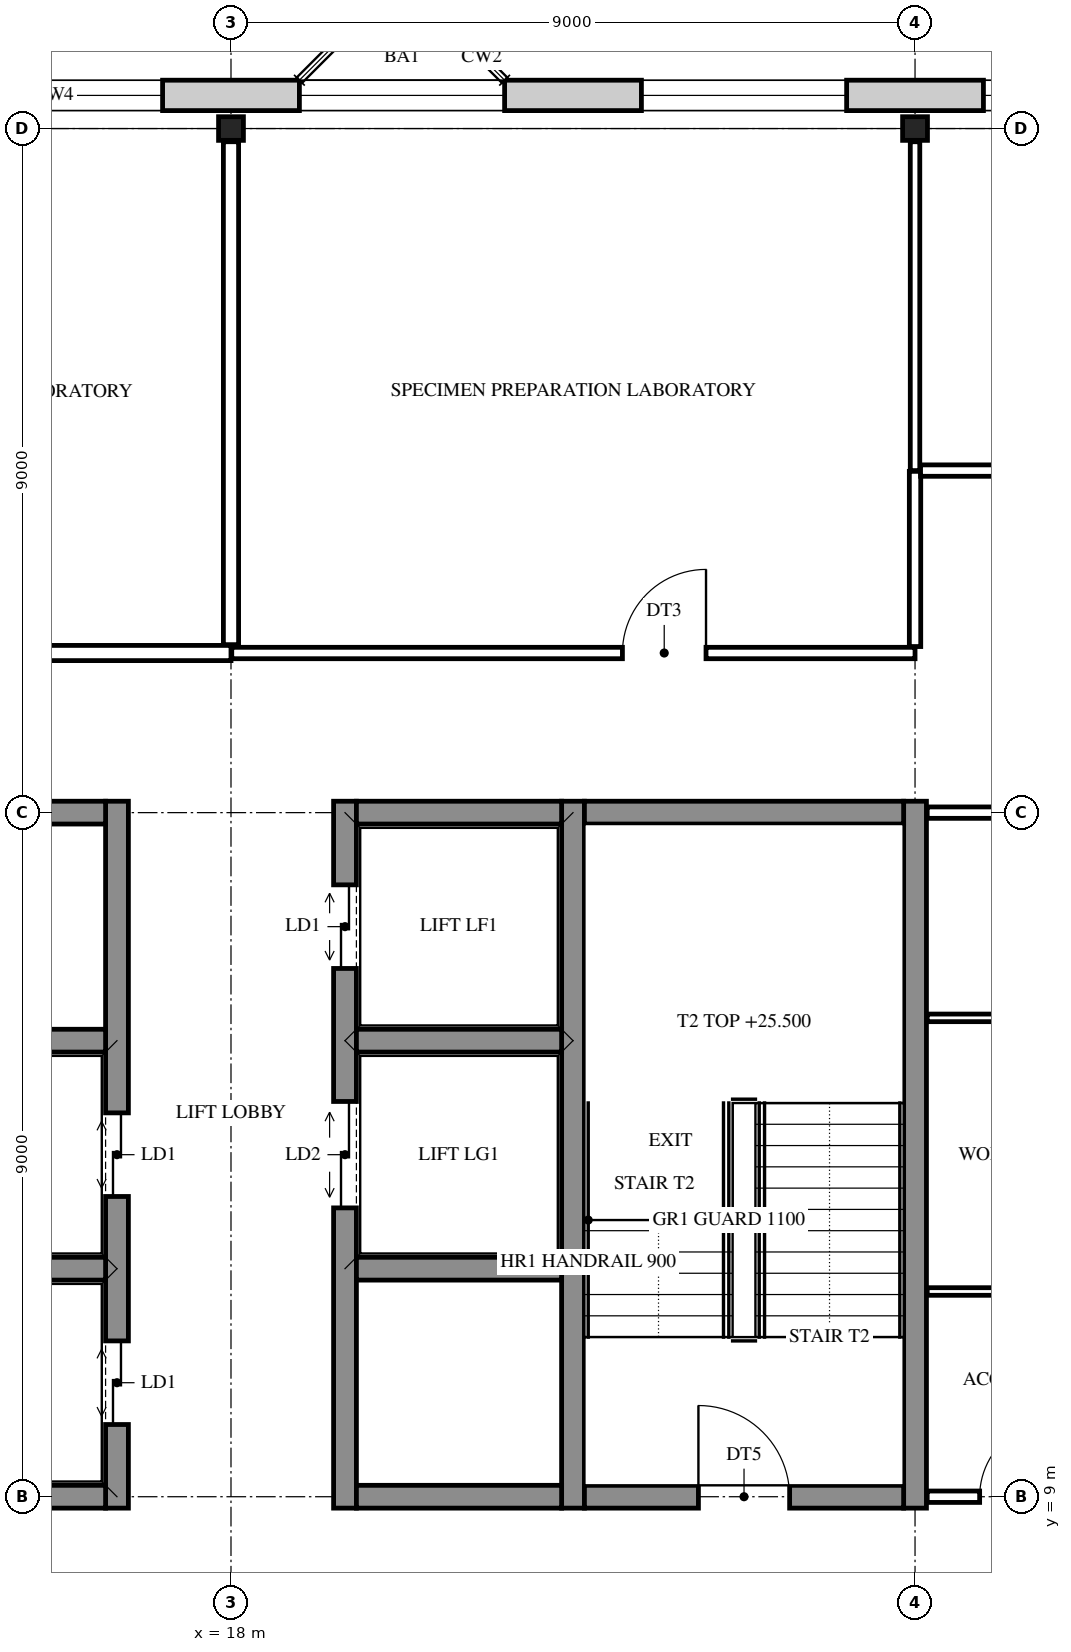
"""IFC4 building model, lengths in metres.
Left out: names, types, materials, properties, quantities, classifications, styles, units other than length and angle.
Written with IfcOpenShell. Run it as: python <this file> out.ifc"""

import sys

from ifc_helpers import new_model, si_unit, direction, frame, frame_2d, origin, origin_2d, place, context, subcontext, project, spatial, rectangle, i_section, extrude, element, fill, save


model = new_model("IFC4")
c1 = context("Model", 3, precision=1e-05, world=origin(), true_north=direction((0.0, 1.0)))
c2 = subcontext(c1, "Body", "Model", "MODEL_VIEW")
j1 = project(units=[si_unit("LENGTHUNIT", "METRE"), si_unit("PLANEANGLEUNIT", "RADIAN")], contexts=[c1])
p1 = place(None, origin())
s1 = spatial("IfcSite", under=j1, at=p1, CompositionType="ELEMENT")
p2 = place(p1, origin())
s2 = spatial("IfcBuilding", under=s1, at=p2, CompositionType="ELEMENT")
p3 = place(p2, frame((0.0, 0.0, 23.4)))
s3 = spatial("IfcBuildingStorey", under=s2, at=p3, CompositionType="ELEMENT", Elevation=23.4)
for number, where, z_axis, x_axis in (
    (1, (18.0, 27.0, 0.0), (0.0, 0.0, 1.0), (0.0, 1.0, 0.0)),
    (2, (27.0, 27.0, 0.0), (0.0, 0.0, 1.0), (0.0, 1.0, 0.0)),
):
    element("IfcColumn", number, at=place(p3, frame(where, z_axis=z_axis, x_axis=x_axis)), inside=s3, PredefinedType="COLUMN", context=c2, shape_type="SweptSolid", body=[
        extrude(i_section(OverallWidth=0.311, OverallDepth=0.327, WebThickness=0.016, FlangeThickness=0.025, FilletRadius=0.017, at=origin_2d()), origin(), (0.0, 0.0, 1.0), 4.2),
    ])
p4 = place(p3, frame((16.5, 8.85, 0.0), z_axis=(0.0, 0.0, 1.0), x_axis=(0.0, 1.0, 0.0)))
e3 = element("IfcWall", 3, at=p4, inside=s3, PredefinedType="SHEAR", context=c2, shape_type="SweptSolid", body=[
    extrude(rectangle(XDim=9.3, YDim=0.3, at=frame_2d((4.65, 0.0))), origin(), (0.0, 0.0, 1.0), 4.2),
])
p5 = place(p4, frame((1.1, 0.0, 0.0)))
e4 = element("IfcOpeningElement", 4, at=p5, cuts=e3, PredefinedType="OPENING", context=c2, shape_type="SweptSolid", body=[
    extrude(rectangle(XDim=1.1, YDim=2.1, at=frame_2d((0.55, 1.05))), frame((0.0, 0.16, 0.0), z_axis=(0.0, -1.0, 0.0), x_axis=(1.0, 0.0, 0.0)), (0.0, 0.0, 1.0), 0.32),
])
p6 = place(p4, frame((4.1, 0.0, 0.0)))
e5 = element("IfcOpeningElement", 5, at=p6, cuts=e3, PredefinedType="OPENING", context=c2, shape_type="SweptSolid", body=[
    extrude(rectangle(XDim=1.1, YDim=2.1, at=frame_2d((0.55, 1.05))), frame((0.0, 0.16, 0.0), z_axis=(0.0, -1.0, 0.0), x_axis=(1.0, 0.0, 0.0)), (0.0, 0.0, 1.0), 0.32),
])
p7 = place(p3, frame((19.5, 8.85, 0.0), z_axis=(0.0, 0.0, 1.0), x_axis=(0.0, 1.0, 0.0)))
e6 = element("IfcWall", 6, at=p7, inside=s3, PredefinedType="SHEAR", context=c2, shape_type="SweptSolid", body=[
    extrude(rectangle(XDim=9.3, YDim=0.3, at=frame_2d((4.65, 0.0))), origin(), (0.0, 0.0, 1.0), 4.2),
])
p8 = place(p7, frame((3.95, 0.0, 0.0)))
e7 = element("IfcOpeningElement", 7, at=p8, cuts=e6, PredefinedType="OPENING", context=c2, shape_type="SweptSolid", body=[
    extrude(rectangle(XDim=1.4, YDim=2.1, at=frame_2d((0.7, 1.05))), frame((0.0, 0.16, 0.0), z_axis=(0.0, -1.0, 0.0), x_axis=(1.0, 0.0, 0.0)), (0.0, 0.0, 1.0), 0.32),
])
p9 = place(p7, frame((7.1, 0.0, 0.0)))
e8 = element("IfcOpeningElement", 8, at=p9, cuts=e6, PredefinedType="OPENING", context=c2, shape_type="SweptSolid", body=[
    extrude(rectangle(XDim=1.1, YDim=2.1, at=frame_2d((0.55, 1.05))), frame((0.0, 0.16, 0.0), z_axis=(0.0, -1.0, 0.0), x_axis=(1.0, 0.0, 0.0)), (0.0, 0.0, 1.0), 0.32),
])
for number, where, z_axis, x_axis in (
    (9, (22.5, 8.85, 0.0), (0.0, 0.0, 1.0), (0.0, 1.0, 0.0)),
    (10, (27.0, 8.85, 0.0), (0.0, 0.0, 1.0), (0.0, 1.0, 0.0)),
):
    element("IfcWall", number, at=place(p3, frame(where, z_axis=z_axis, x_axis=x_axis)), inside=s3, PredefinedType="SHEAR", context=c2, shape_type="SweptSolid", body=[
        extrude(rectangle(XDim=9.3, YDim=0.3, at=frame_2d((4.65, 0.0))), origin(), (0.0, 0.0, 1.0), 4.2),
    ])
for number, where, z_axis, x_axis in (
    (11, (13.65, 9.0, 0.0), (0.0, 0.0, 1.0), (1.0, 0.0, 0.0)),
    (12, (19.65, 9.0, 0.0), (0.0, 0.0, 1.0), (1.0, 0.0, 0.0)),
):
    element("IfcWall", number, at=place(p3, frame(where, z_axis=z_axis, x_axis=x_axis)), inside=s3, PredefinedType="SHEAR", context=c2, shape_type="SweptSolid", body=[
        extrude(rectangle(XDim=2.7, YDim=0.3, at=frame_2d((1.35, 0.0))), origin(), (0.0, 0.0, 1.0), 4.2),
    ])
p10 = place(p3, frame((22.65, 9.0, 0.0), z_axis=(0.0, 0.0, 1.0), x_axis=(1.0, 0.0, 0.0)))
e13 = element("IfcWall", 13, at=p10, inside=s3, PredefinedType="SHEAR", context=c2, shape_type="SweptSolid", body=[
    extrude(rectangle(XDim=4.2, YDim=0.3, at=frame_2d((2.1, 0.0))), origin(), (0.0, 0.0, 1.0), 4.2),
])
p11 = place(p10, frame((1.5, 0.0, 0.0)))
e14 = element("IfcOpeningElement", 14, at=p11, cuts=e13, PredefinedType="OPENING", context=c2, shape_type="SweptSolid", body=[
    extrude(rectangle(XDim=1.2, YDim=2.1, at=frame_2d((0.6, 1.05))), frame((0.0, 0.16, 0.0), z_axis=(0.0, -1.0, 0.0), x_axis=(1.0, 0.0, 0.0)), (0.0, 0.0, 1.0), 0.32),
])
for number, where, z_axis, x_axis in (
    (15, (13.65, 12.0, 0.0), (0.0, 0.0, 1.0), (1.0, 0.0, 0.0)),
    (16, (19.65, 12.0, 0.0), (0.0, 0.0, 1.0), (1.0, 0.0, 0.0)),
    (17, (13.65, 15.0, 0.0), (0.0, 0.0, 1.0), (1.0, 0.0, 0.0)),
    (18, (19.65, 15.0, 0.0), (0.0, 0.0, 1.0), (1.0, 0.0, 0.0)),
    (19, (13.65, 18.0, 0.0), (0.0, 0.0, 1.0), (1.0, 0.0, 0.0)),
    (20, (19.65, 18.0, 0.0), (0.0, 0.0, 1.0), (1.0, 0.0, 0.0)),
):
    element("IfcWall", number, at=place(p3, frame(where, z_axis=z_axis, x_axis=x_axis)), inside=s3, PredefinedType="SHEAR", context=c2, shape_type="SweptSolid", body=[
        extrude(rectangle(XDim=2.7, YDim=0.3, at=frame_2d((1.35, 0.0))), origin(), (0.0, 0.0, 1.0), 4.2),
    ])
p12 = place(p3, frame((22.65, 18.0, 0.0), z_axis=(0.0, 0.0, 1.0), x_axis=(1.0, 0.0, 0.0)))
e21 = element("IfcWall", 21, at=p12, inside=s3, PredefinedType="SHEAR", context=c2, shape_type="SweptSolid", body=[
    extrude(rectangle(XDim=4.2, YDim=0.3, at=frame_2d((2.1, 0.0))), origin(), (0.0, 0.0, 1.0), 4.2),
])
p13 = place(p3, frame((-0.625, 27.436, 0.0), z_axis=(0.0, 0.0, 1.0), x_axis=(1.0, 0.0, 0.0)))
e22 = element("IfcWall", 22, at=p13, inside=s3, PredefinedType="STANDARD", context=c2, shape_type="SweptSolid", body=[
    extrude(rectangle(XDim=32.75, YDim=0.4, at=frame_2d((16.375, 0.0))), origin(), (0.0, 0.0, 1.0), 4.2),
])
p14 = place(p13, frame((1.525, 0.0, 0.9)))
e23 = element("IfcOpeningElement", 23, at=p14, cuts=e22, PredefinedType="OPENING", context=c2, shape_type="SweptSolid", body=[
    extrude(rectangle(XDim=2.7, YDim=2.5, at=frame_2d((1.35, 1.25))), frame((0.0, 0.21, 0.0), z_axis=(0.0, -1.0, 0.0), x_axis=(1.0, 0.0, 0.0)), (0.0, 0.0, 1.0), 0.42),
])
p15 = place(p13, frame((6.025, 0.0, 0.9)))
e24 = element("IfcOpeningElement", 24, at=p15, cuts=e22, PredefinedType="OPENING", context=c2, shape_type="SweptSolid", body=[
    extrude(rectangle(XDim=2.7, YDim=2.5, at=frame_2d((1.35, 1.25))), frame((0.0, 0.21, 0.0), z_axis=(0.0, -1.0, 0.0), x_axis=(1.0, 0.0, 0.0)), (0.0, 0.0, 1.0), 0.42),
])
p16 = place(p13, frame((10.525, 0.0, 0.9)))
e25 = element("IfcOpeningElement", 25, at=p16, cuts=e22, PredefinedType="OPENING", context=c2, shape_type="SweptSolid", body=[
    extrude(rectangle(XDim=2.7, YDim=2.5, at=frame_2d((1.35, 1.25))), frame((0.0, 0.21, 0.0), z_axis=(0.0, -1.0, 0.0), x_axis=(1.0, 0.0, 0.0)), (0.0, 0.0, 1.0), 0.42),
])
p17 = place(p13, frame((15.025, 0.0, 0.9)))
e26 = element("IfcOpeningElement", 26, at=p17, cuts=e22, PredefinedType="OPENING", context=c2, shape_type="SweptSolid", body=[
    extrude(rectangle(XDim=2.7, YDim=2.5, at=frame_2d((1.35, 1.25))), frame((0.0, 0.21, 0.0), z_axis=(0.0, -1.0, 0.0), x_axis=(1.0, 0.0, 0.0)), (0.0, 0.0, 1.0), 0.42),
])
p18 = place(p13, frame((19.525, 0.0, 0.9)))
e27 = element("IfcOpeningElement", 27, at=p18, cuts=e22, PredefinedType="OPENING", context=c2, shape_type="SweptSolid", body=[
    extrude(rectangle(XDim=2.7, YDim=2.5, at=frame_2d((1.35, 1.25))), frame((0.0, 0.21, 0.0), z_axis=(0.0, -1.0, 0.0), x_axis=(1.0, 0.0, 0.0)), (0.0, 0.0, 1.0), 0.42),
])
p19 = place(p13, frame((24.025, 0.0, 0.9)))
e28 = element("IfcOpeningElement", 28, at=p19, cuts=e22, PredefinedType="OPENING", context=c2, shape_type="SweptSolid", body=[
    extrude(rectangle(XDim=2.7, YDim=2.5, at=frame_2d((1.35, 1.25))), frame((0.0, 0.21, 0.0), z_axis=(0.0, -1.0, 0.0), x_axis=(1.0, 0.0, 0.0)), (0.0, 0.0, 1.0), 0.42),
])
p20 = place(p13, frame((28.525, 0.0, 0.9)))
e29 = element("IfcOpeningElement", 29, at=p20, cuts=e22, PredefinedType="OPENING", context=c2, shape_type="SweptSolid", body=[
    extrude(rectangle(XDim=2.7, YDim=2.5, at=frame_2d((1.35, 1.25))), frame((0.0, 0.21, 0.0), z_axis=(0.0, -1.0, 0.0), x_axis=(1.0, 0.0, 0.0)), (0.0, 0.0, 1.0), 0.42),
])
p21 = place(p3, frame((18.0, 20.21, 0.0), z_axis=(0.0, 0.0, 1.0), x_axis=(0.0, 1.0, 0.0)))
e30 = element("IfcWall", 30, at=p21, inside=s3, PredefinedType="PARTITIONING", context=c2, shape_type="SweptSolid", body=[
    extrude(rectangle(XDim=6.616, YDim=0.2, at=frame_2d((3.308, 0.0))), origin(), (0.0, 0.0, 1.0), 3.537),
])
p22 = place(p3, frame((27.0, 20.185, 0.0), z_axis=(0.0, 0.0, 1.0), x_axis=(0.0, 1.0, 0.0)))
e31 = element("IfcWall", 31, at=p22, inside=s3, PredefinedType="PARTITIONING", context=c2, shape_type="SweptSolid", body=[
    extrude(rectangle(XDim=2.305, YDim=0.15, at=frame_2d((1.152, 0.0))), origin(), (0.0, 0.0, 1.0), 3.537),
])
p23 = place(p3, frame((27.0, 22.5, 0.0), z_axis=(0.0, 0.0, 1.0), x_axis=(0.0, 1.0, 0.0)))
e32 = element("IfcWall", 32, at=p23, inside=s3, PredefinedType="PARTITIONING", context=c2, shape_type="SweptSolid", body=[
    extrude(rectangle(XDim=4.326, YDim=0.125, at=frame_2d((2.163, 0.0))), origin(), (0.0, 0.0, 1.0), 3.537),
])
p24 = place(p3, frame((27.16, 9.0, 0.0), z_axis=(0.0, 0.0, 1.0), x_axis=(1.0, 0.0, 0.0)))
e33 = element("IfcWall", 33, at=p24, inside=s3, PredefinedType="PARTITIONING", context=c2, shape_type="SweptSolid", body=[
    extrude(rectangle(XDim=2.455, YDim=0.15, at=frame_2d((1.228, 0.0))), origin(), (0.0, 0.0, 1.0), 3.537),
])
p25 = place(p24, frame((0.69, 0.0, 0.0)))
e34 = element("IfcOpeningElement", 34, at=p25, cuts=e33, PredefinedType="OPENING", context=c2, shape_type="SweptSolid", body=[
    extrude(rectangle(XDim=1.0, YDim=2.1, at=frame_2d((0.5, 1.05))), frame((0.0, 0.085, 0.0), z_axis=(0.0, -1.0, 0.0), x_axis=(1.0, 0.0, 0.0)), (0.0, 0.0, 1.0), 0.17),
])
for number, where, z_axis, x_axis in (
    (35, (27.16, 11.7, 0.0), (0.0, 0.0, 1.0), (1.0, 0.0, 0.0)),
    (36, (27.16, 15.3, 0.0), (0.0, 0.0, 1.0), (1.0, 0.0, 0.0)),
):
    element("IfcWall", number, at=place(p3, frame(where, z_axis=z_axis, x_axis=x_axis)), inside=s3, PredefinedType="PARTITIONING", context=c2, shape_type="SweptSolid", body=[
        extrude(rectangle(XDim=2.455, YDim=0.1, at=frame_2d((1.228, 0.0))), origin(), (0.0, 0.0, 1.0), 3.537),
    ])
p26 = place(p3, frame((27.16, 18.0, 0.0), z_axis=(0.0, 0.0, 1.0), x_axis=(1.0, 0.0, 0.0)))
e37 = element("IfcWall", 37, at=p26, inside=s3, PredefinedType="PARTITIONING", context=c2, shape_type="SweptSolid", body=[
    extrude(rectangle(XDim=4.175, YDim=0.15, at=frame_2d((2.087, 0.0))), origin(), (0.0, 0.0, 1.0), 3.537),
])
p27 = place(p3, frame((9.0, 20.1, 0.0), z_axis=(0.0, 0.0, 1.0), x_axis=(1.0, 0.0, 0.0)))
e38 = element("IfcWall", 38, at=p27, inside=s3, PredefinedType="PARTITIONING", context=c2, shape_type="SweptSolid", body=[
    extrude(rectangle(XDim=9.0, YDim=0.2, at=frame_2d((4.5, 0.0))), origin(), (0.0, 0.0, 1.0), 3.537),
])
p28 = place(p27, frame((4.0, 0.0, 0.0)))
e39 = element("IfcOpeningElement", 39, at=p28, cuts=e38, PredefinedType="OPENING", context=c2, shape_type="SweptSolid", body=[
    extrude(rectangle(XDim=1.0, YDim=2.1, at=frame_2d((0.5, 1.05))), frame((0.0, 0.11, 0.0), z_axis=(0.0, -1.0, 0.0), x_axis=(1.0, 0.0, 0.0)), (0.0, 0.0, 1.0), 0.22),
])
p29 = place(p3, frame((18.01, 20.1, 0.0), z_axis=(0.0, 0.0, 1.0), x_axis=(1.0, 0.0, 0.0)))
e40 = element("IfcWall", 40, at=p29, inside=s3, PredefinedType="PARTITIONING", context=c2, shape_type="SweptSolid", body=[
    extrude(rectangle(XDim=8.99, YDim=0.15, at=frame_2d((4.495, 0.0))), origin(), (0.0, 0.0, 1.0), 3.537),
])
p30 = place(p29, frame((5.14, 0.0, 0.0)))
e41 = element("IfcOpeningElement", 41, at=p30, cuts=e40, PredefinedType="OPENING", context=c2, shape_type="SweptSolid", body=[
    extrude(rectangle(XDim=1.1, YDim=2.1, at=frame_2d((0.55, 1.05))), frame((0.0, 0.085, 0.0), z_axis=(0.0, -1.0, 0.0), x_axis=(1.0, 0.0, 0.0)), (0.0, 0.0, 1.0), 0.17),
])
p31 = place(p3, frame((27.073, 22.5, 0.0), z_axis=(0.0, 0.0, 1.0), x_axis=(1.0, 0.0, 0.0)))
e42 = element("IfcWall", 42, at=p31, inside=s3, PredefinedType="PARTITIONING", context=c2, shape_type="SweptSolid", body=[
    extrude(rectangle(XDim=4.643, YDim=0.15, at=frame_2d((2.321, 0.0))), origin(), (0.0, 0.0, 1.0), 3.537),
])
p32 = place(p31, frame((1.627, 0.0, 0.0)))
e43 = element("IfcOpeningElement", 43, at=p32, cuts=e42, PredefinedType="OPENING", context=c2, shape_type="SweptSolid", body=[
    extrude(rectangle(XDim=1.1, YDim=2.1, at=frame_2d((0.55, 1.05))), frame((0.0, 0.085, 0.0), z_axis=(0.0, -1.0, 0.0), x_axis=(1.0, 0.0, 0.0)), (0.0, 0.0, 1.0), 0.17),
])
p33 = place(p17, origin())
e44 = element("IfcWindow", 44, at=p33, inside=s3, PartitioningType="SINGLE_PANEL", PredefinedType="WINDOW", context=c2, shape_type="SweptSolid", body=[
    extrude(rectangle(XDim=2.7, YDim=2.5, at=frame_2d((1.35, 1.25))), frame((0.0, 0.03, 0.0), z_axis=(0.0, -1.0, 0.0), x_axis=(1.0, 0.0, 0.0)), (0.0, 0.0, 1.0), 0.06),
])
fill(e26, e44)
p34 = place(p18, origin())
e45 = element("IfcWindow", 45, at=p34, inside=s3, PartitioningType="SINGLE_PANEL", PredefinedType="WINDOW", context=c2, shape_type="SweptSolid", body=[
    extrude(rectangle(XDim=2.7, YDim=2.5, at=frame_2d((1.35, 1.25))), frame((0.0, 0.03, 0.0), z_axis=(0.0, -1.0, 0.0), x_axis=(1.0, 0.0, 0.0)), (0.0, 0.0, 1.0), 0.06),
])
fill(e27, e45)
p35 = place(p19, origin())
e46 = element("IfcWindow", 46, at=p35, inside=s3, PartitioningType="SINGLE_PANEL", PredefinedType="WINDOW", context=c2, shape_type="SweptSolid", body=[
    extrude(rectangle(XDim=2.7, YDim=2.5, at=frame_2d((1.35, 1.25))), frame((0.0, 0.03, 0.0), z_axis=(0.0, -1.0, 0.0), x_axis=(1.0, 0.0, 0.0)), (0.0, 0.0, 1.0), 0.06),
])
fill(e28, e46)
p36 = place(p20, origin())
e47 = element("IfcWindow", 47, at=p36, inside=s3, PartitioningType="SINGLE_PANEL", PredefinedType="WINDOW", context=c2, shape_type="SweptSolid", body=[
    extrude(rectangle(XDim=2.7, YDim=2.5, at=frame_2d((1.35, 1.25))), frame((0.0, 0.03, 0.0), z_axis=(0.0, -1.0, 0.0), x_axis=(1.0, 0.0, 0.0)), (0.0, 0.0, 1.0), 0.06),
])
fill(e29, e47)
p37 = place(p11, origin())
e48 = element("IfcDoor", 48, at=p37, inside=s3, OperationType="SINGLE_SWING_LEFT", PredefinedType="DOOR", context=c2, shape_type="SweptSolid", body=[
    extrude(rectangle(XDim=1.2, YDim=2.1, at=frame_2d((0.6, 1.05))), frame((0.0, 0.025, 0.0), z_axis=(0.0, -1.0, 0.0), x_axis=(1.0, 0.0, 0.0)), (0.0, 0.0, 1.0), 0.05),
])
fill(e14, e48)
p38 = place(p25, origin())
e49 = element("IfcDoor", 49, at=p38, inside=s3, OperationType="SINGLE_SWING_RIGHT", PredefinedType="DOOR", context=c2, shape_type="SweptSolid", body=[
    extrude(rectangle(XDim=1.0, YDim=2.1, at=frame_2d((0.5, 1.05))), frame((0.0, 0.025, 0.0), z_axis=(0.0, -1.0, 0.0), x_axis=(1.0, 0.0, 0.0)), (0.0, 0.0, 1.0), 0.05),
])
fill(e34, e49)
p39 = place(p30, origin())
e50 = element("IfcDoor", 50, at=p39, inside=s3, OperationType="SINGLE_SWING_RIGHT", PredefinedType="DOOR", context=c2, shape_type="SweptSolid", body=[
    extrude(rectangle(XDim=1.1, YDim=2.1, at=frame_2d((0.55, 1.05))), frame((0.0, 0.025, 0.0), z_axis=(0.0, -1.0, 0.0), x_axis=(1.0, 0.0, 0.0)), (0.0, 0.0, 1.0), 0.05),
])
fill(e41, e50)
p40 = place(p5, origin())
e51 = element("IfcDoor", 51, at=p40, inside=s3, OperationType="DOUBLE_DOOR_SLIDING", PredefinedType="DOOR", context=c2, shape_type="SweptSolid", body=[
    extrude(rectangle(XDim=1.1, YDim=2.1, at=frame_2d((0.55, 1.05))), frame((0.0, 0.025, 0.0), z_axis=(0.0, -1.0, 0.0), x_axis=(1.0, 0.0, 0.0)), (0.0, 0.0, 1.0), 0.05),
])
fill(e4, e51)
p41 = place(p6, origin())
e52 = element("IfcDoor", 52, at=p41, inside=s3, OperationType="DOUBLE_DOOR_SLIDING", PredefinedType="DOOR", context=c2, shape_type="SweptSolid", body=[
    extrude(rectangle(XDim=1.1, YDim=2.1, at=frame_2d((0.55, 1.05))), frame((0.0, 0.025, 0.0), z_axis=(0.0, -1.0, 0.0), x_axis=(1.0, 0.0, 0.0)), (0.0, 0.0, 1.0), 0.05),
])
fill(e5, e52)
p42 = place(p8, origin())
e53 = element("IfcDoor", 53, at=p42, inside=s3, OperationType="DOUBLE_DOOR_SLIDING", PredefinedType="DOOR", context=c2, shape_type="SweptSolid", body=[
    extrude(rectangle(XDim=1.4, YDim=2.1, at=frame_2d((0.7, 1.05))), frame((0.0, 0.025, 0.0), z_axis=(0.0, -1.0, 0.0), x_axis=(1.0, 0.0, 0.0)), (0.0, 0.0, 1.0), 0.05),
])
fill(e7, e53)
p43 = place(p9, origin())
e54 = element("IfcDoor", 54, at=p43, inside=s3, OperationType="DOUBLE_DOOR_SLIDING", PredefinedType="DOOR", context=c2, shape_type="SweptSolid", body=[
    extrude(rectangle(XDim=1.1, YDim=2.1, at=frame_2d((0.55, 1.05))), frame((0.0, 0.025, 0.0), z_axis=(0.0, -1.0, 0.0), x_axis=(1.0, 0.0, 0.0)), (0.0, 0.0, 1.0), 0.05),
])
fill(e8, e54)
save(model, sys.argv[1])
